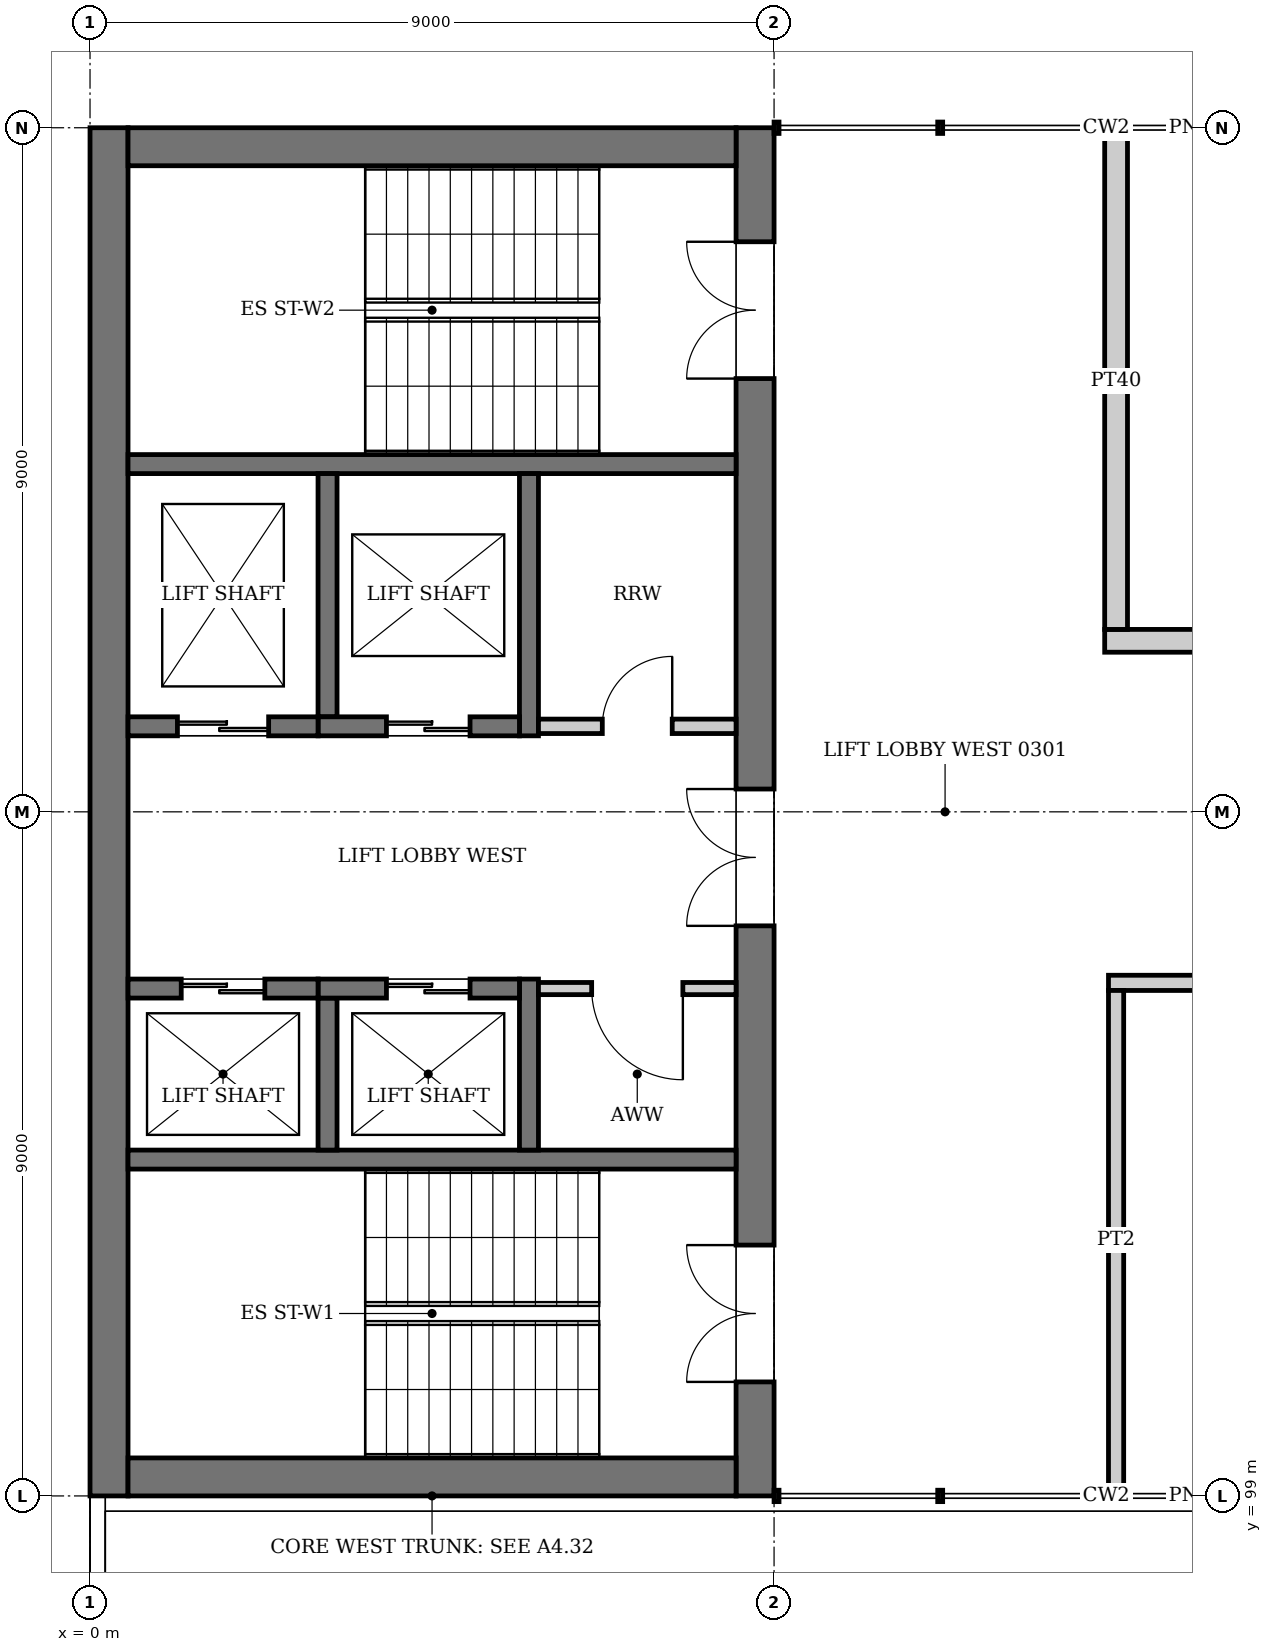
"""IFC4 building model, lengths in metres.
Left out: names, types, materials, properties, quantities, classifications, styles, units other than length and angle.
Written with IfcOpenShell. Run it as: python <this file> out.ifc"""

import sys

from ifc_helpers import new_model, si_unit, direction, frame, frame_2d, origin, place, context, subcontext, project, spatial, rectangle, extrude, element, fill, save


model = new_model("IFC4")
c1 = context("Model", 3, precision=1e-05, world=origin(), true_north=direction((0.0, 1.0)))
c2 = subcontext(c1, "Body", "Model", "MODEL_VIEW")
j1 = project(units=[si_unit("LENGTHUNIT", "METRE"), si_unit("PLANEANGLEUNIT", "RADIAN")], contexts=[c1])
p1 = place(None, origin())
s1 = spatial("IfcSite", under=j1, at=p1, CompositionType="ELEMENT")
p2 = place(p1, origin())
s2 = spatial("IfcBuilding", under=s1, at=p2, CompositionType="ELEMENT")
p3 = place(p2, frame((0.0, 0.0, 15.0)))
s3 = spatial("IfcBuildingStorey", under=s2, at=p3, CompositionType="ELEMENT", Elevation=15.0)
p4 = place(p3, frame((0.25, 99.0, 0.0), z_axis=(0.0, 0.0, 1.0), x_axis=(0.0, 1.0, 0.0)))
e1 = element("IfcWall", 1, at=p4, inside=s3, PredefinedType="SHEAR", context=c2, shape_type="SweptSolid", body=[
    extrude(rectangle(XDim=18.0, YDim=0.5, at=frame_2d((9.0, 0.0))), origin(), (0.0, 0.0, 1.0), 4.2),
])
p5 = place(p3, frame((8.75, 99.0, 0.0), z_axis=(0.0, 0.0, 1.0), x_axis=(0.0, 1.0, 0.0)))
e2 = element("IfcWall", 2, at=p5, inside=s3, PredefinedType="SHEAR", context=c2, shape_type="SweptSolid", body=[
    extrude(rectangle(XDim=18.0, YDim=0.5, at=frame_2d((9.0, 0.0))), origin(), (0.0, 0.0, 1.0), 4.2),
])
p6 = place(p5, frame((1.5, 0.0, 0.0)))
e3 = element("IfcOpeningElement", 3, at=p6, cuts=e2, PredefinedType="OPENING", context=c2, shape_type="SweptSolid", body=[
    extrude(rectangle(XDim=1.8, YDim=2.1, at=frame_2d((0.9, 1.05))), frame((0.0, 0.26, 0.0), z_axis=(0.0, -1.0, 0.0), x_axis=(1.0, 0.0, 0.0)), (0.0, 0.0, 1.0), 0.52),
])
p7 = place(p5, frame((14.7, 0.0, 0.0)))
e4 = element("IfcOpeningElement", 4, at=p7, cuts=e2, PredefinedType="OPENING", context=c2, shape_type="SweptSolid", body=[
    extrude(rectangle(XDim=1.8, YDim=2.1, at=frame_2d((0.9, 1.05))), frame((0.0, 0.26, 0.0), z_axis=(0.0, -1.0, 0.0), x_axis=(1.0, 0.0, 0.0)), (0.0, 0.0, 1.0), 0.52),
])
p8 = place(p5, frame((7.5, 0.0, 0.0)))
e5 = element("IfcOpeningElement", 5, at=p8, cuts=e2, PredefinedType="OPENING", context=c2, shape_type="SweptSolid", body=[
    extrude(rectangle(XDim=1.8, YDim=2.1, at=frame_2d((0.9, 1.05))), frame((0.0, 0.26, 0.0), z_axis=(0.0, -1.0, 0.0), x_axis=(1.0, 0.0, 0.0)), (0.0, 0.0, 1.0), 0.52),
])
for number, where, z_axis, x_axis in (
    (6, (0.5, 99.25, 0.0), (0.0, 0.0, 1.0), (1.0, 0.0, 0.0)),
    (7, (0.5, 116.75, 0.0), (0.0, 0.0, 1.0), (1.0, 0.0, 0.0)),
):
    element("IfcWall", number, at=place(p3, frame(where, z_axis=z_axis, x_axis=x_axis)), inside=s3, PredefinedType="SHEAR", context=c2, shape_type="SweptSolid", body=[
        extrude(rectangle(XDim=8.0, YDim=0.5, at=frame_2d((4.0, 0.0))), origin(), (0.0, 0.0, 1.0), 4.2),
    ])
p9 = place(p3, frame((0.1, 90.0, 0.0), z_axis=(0.0, 0.0, 1.0), x_axis=(0.0, 1.0, 0.0)))
e8 = element("IfcWall", 8, at=p9, inside=s3, PredefinedType="PARAPET", context=c2, shape_type="SweptSolid", body=[
    extrude(rectangle(XDim=9.0, YDim=0.2, at=frame_2d((4.5, 0.0))), origin(), (0.0, 0.0, 1.0), 1.14),
])
for number, where, z_axis, x_axis in (
    (9, (8.5, 103.425, 0.0), (0.0, 0.0, 1.0), (-1.0, 0.0, 0.0)),
    (10, (8.5, 112.575, 0.0), (0.0, 0.0, 1.0), (-1.0, 0.0, 0.0)),
):
    element("IfcWall", number, at=place(p3, frame(where, z_axis=z_axis, x_axis=x_axis)), inside=s3, PredefinedType="SOLIDWALL", context=c2, shape_type="SweptSolid", body=[
        extrude(rectangle(XDim=8.0, YDim=0.25, at=frame_2d((4.0, 0.0))), origin(), (0.0, 0.0, 1.0), 3.95),
    ])
p10 = place(p3, frame((5.775, 103.55, 0.0), z_axis=(0.0, 0.0, 1.0), x_axis=(0.0, 1.0, 0.0)))
e11 = element("IfcWall", 11, at=p10, inside=s3, PredefinedType="SOLIDWALL", context=c2, shape_type="SweptSolid", body=[
    extrude(rectangle(XDim=2.25, YDim=0.25, at=frame_2d((1.125, 0.0))), origin(), (0.0, 0.0, 1.0), 4.2),
])
p11 = place(p3, frame((3.125, 103.55, 0.0), z_axis=(0.0, 0.0, 1.0), x_axis=(0.0, 1.0, 0.0)))
e12 = element("IfcWall", 12, at=p11, inside=s3, PredefinedType="SOLIDWALL", context=c2, shape_type="SweptSolid", body=[
    extrude(rectangle(XDim=2.0, YDim=0.25, at=frame_2d((1.0, 0.0))), origin(), (0.0, 0.0, 1.0), 4.2),
])
p12 = place(p3, frame((5.65, 105.675, 0.0), z_axis=(0.0, 0.0, 1.0), x_axis=(-1.0, 0.0, 0.0)))
e13 = element("IfcWall", 13, at=p12, inside=s3, PredefinedType="SOLIDWALL", context=c2, shape_type="SweptSolid", body=[
    extrude(rectangle(XDim=2.65, YDim=0.25, at=frame_2d((1.325, 0.0))), origin(), (0.0, 0.0, 1.0), 4.2),
])
p13 = place(p12, frame((0.65, 0.0, 0.0)))
e14 = element("IfcOpeningElement", 14, at=p13, cuts=e13, PredefinedType="OPENING", context=c2, shape_type="SweptSolid", body=[
    extrude(rectangle(XDim=1.1, YDim=2.1, at=frame_2d((0.55, 1.05))), frame((0.0, 0.135, 0.0), z_axis=(0.0, -1.0, 0.0), x_axis=(1.0, 0.0, 0.0)), (0.0, 0.0, 1.0), 0.27),
])
p14 = place(p3, frame((3.0, 105.675, 0.0), z_axis=(0.0, 0.0, 1.0), x_axis=(-1.0, 0.0, 0.0)))
e15 = element("IfcWall", 15, at=p14, inside=s3, PredefinedType="SOLIDWALL", context=c2, shape_type="SweptSolid", body=[
    extrude(rectangle(XDim=2.5, YDim=0.25, at=frame_2d((1.25, 0.0))), origin(), (0.0, 0.0, 1.0), 4.2),
])
p15 = place(p14, frame((0.7, 0.0, 0.0)))
e16 = element("IfcOpeningElement", 16, at=p15, cuts=e15, PredefinedType="OPENING", context=c2, shape_type="SweptSolid", body=[
    extrude(rectangle(XDim=1.1, YDim=2.1, at=frame_2d((0.55, 1.05))), frame((0.0, 0.135, 0.0), z_axis=(0.0, -1.0, 0.0), x_axis=(1.0, 0.0, 0.0)), (0.0, 0.0, 1.0), 0.27),
])
p16 = place(p3, frame((5.775, 109.0, 0.0), z_axis=(0.0, 0.0, 1.0), x_axis=(0.0, 1.0, 0.0)))
e17 = element("IfcWall", 17, at=p16, inside=s3, PredefinedType="SOLIDWALL", context=c2, shape_type="SweptSolid", body=[
    extrude(rectangle(XDim=3.45, YDim=0.25, at=frame_2d((1.725, 0.0))), origin(), (0.0, 0.0, 1.0), 4.2),
])
p17 = place(p3, frame((3.125, 109.25, 0.0), z_axis=(0.0, 0.0, 1.0), x_axis=(0.0, 1.0, 0.0)))
e18 = element("IfcWall", 18, at=p17, inside=s3, PredefinedType="SOLIDWALL", context=c2, shape_type="SweptSolid", body=[
    extrude(rectangle(XDim=3.2, YDim=0.25, at=frame_2d((1.6, 0.0))), origin(), (0.0, 0.0, 1.0), 4.2),
])
p18 = place(p3, frame((5.65, 109.125, 0.0), z_axis=(0.0, 0.0, 1.0), x_axis=(-1.0, 0.0, 0.0)))
e19 = element("IfcWall", 19, at=p18, inside=s3, PredefinedType="SOLIDWALL", context=c2, shape_type="SweptSolid", body=[
    extrude(rectangle(XDim=2.65, YDim=0.25, at=frame_2d((1.325, 0.0))), origin(), (0.0, 0.0, 1.0), 4.2),
])
p19 = place(p18, frame((0.65, 0.0, 0.0)))
e20 = element("IfcOpeningElement", 20, at=p19, cuts=e19, PredefinedType="OPENING", context=c2, shape_type="SweptSolid", body=[
    extrude(rectangle(XDim=1.1, YDim=2.1, at=frame_2d((0.55, 1.05))), frame((0.0, 0.135, 0.0), z_axis=(0.0, -1.0, 0.0), x_axis=(1.0, 0.0, 0.0)), (0.0, 0.0, 1.0), 0.27),
])
p20 = place(p3, frame((3.0, 109.125, 0.0), z_axis=(0.0, 0.0, 1.0), x_axis=(-1.0, 0.0, 0.0)))
e21 = element("IfcWall", 21, at=p20, inside=s3, PredefinedType="SOLIDWALL", context=c2, shape_type="SweptSolid", body=[
    extrude(rectangle(XDim=2.5, YDim=0.25, at=frame_2d((1.25, 0.0))), origin(), (0.0, 0.0, 1.0), 4.2),
])
p21 = place(p20, frame((0.65, 0.0, 0.0)))
e22 = element("IfcOpeningElement", 22, at=p21, cuts=e21, PredefinedType="OPENING", context=c2, shape_type="SweptSolid", body=[
    extrude(rectangle(XDim=1.2, YDim=2.1, at=frame_2d((0.6, 1.05))), frame((0.0, 0.135, 0.0), z_axis=(0.0, -1.0, 0.0), x_axis=(1.0, 0.0, 0.0)), (0.0, 0.0, 1.0), 0.27),
])
p22 = place(p3, frame((8.5, 105.675, 0.0), z_axis=(0.0, 0.0, 1.0), x_axis=(-1.0, 0.0, 0.0)))
e23 = element("IfcWall", 23, at=p22, inside=s3, PredefinedType="PARTITIONING", context=c2, shape_type="SweptSolid", body=[
    extrude(rectangle(XDim=2.6, YDim=0.16, at=frame_2d((1.3, 0.0))), origin(), (0.0, 0.0, 1.0), 3.95),
])
p23 = place(p22, frame((0.7, 0.0, 0.0)))
e24 = element("IfcOpeningElement", 24, at=p23, cuts=e23, PredefinedType="OPENING", context=c2, shape_type="SweptSolid", body=[
    extrude(rectangle(XDim=1.2, YDim=2.1, at=frame_2d((0.6, 1.05))), frame((0.0, 0.09, 0.0), z_axis=(0.0, -1.0, 0.0), x_axis=(1.0, 0.0, 0.0)), (0.0, 0.0, 1.0), 0.18),
])
p24 = place(p3, frame((8.5, 109.125, 0.0), z_axis=(0.0, 0.0, 1.0), x_axis=(-1.0, 0.0, 0.0)))
e25 = element("IfcWall", 25, at=p24, inside=s3, PredefinedType="PARTITIONING", context=c2, shape_type="SweptSolid", body=[
    extrude(rectangle(XDim=2.6, YDim=0.19, at=frame_2d((1.3, 0.0))), origin(), (0.0, 0.0, 1.0), 3.95),
])
p25 = place(p24, frame((0.84, 0.0, 0.0)))
e26 = element("IfcOpeningElement", 26, at=p25, cuts=e25, PredefinedType="OPENING", context=c2, shape_type="SweptSolid", body=[
    extrude(rectangle(XDim=0.92, YDim=2.1, at=frame_2d((0.46, 1.05))), frame((0.0, 0.105, 0.0), z_axis=(0.0, -1.0, 0.0), x_axis=(1.0, 0.0, 0.0)), (0.0, 0.0, 1.0), 0.21),
])
p26 = place(p3, frame((13.4, 105.75, 0.0), z_axis=(0.0, 0.0, 1.0), x_axis=(1.0, 0.0, 0.0)))
e27 = element("IfcWall", 27, at=p26, inside=s3, PredefinedType="PARTITIONING", context=c2, shape_type="SweptSolid", body=[
    extrude(rectangle(XDim=27.2, YDim=0.2, at=frame_2d((13.6, 0.0))), origin(), (0.0, 0.0, 1.0), 3.25),
])
p27 = place(p26, frame((5.95, 0.0, 0.0)))
e28 = element("IfcOpeningElement", 28, at=p27, cuts=e27, PredefinedType="OPENING", context=c2, shape_type="SweptSolid", body=[
    extrude(rectangle(XDim=1.8, YDim=2.1, at=frame_2d((0.9, 1.05))), frame((0.0, 0.11, 0.0), z_axis=(0.0, -1.0, 0.0), x_axis=(1.0, 0.0, 0.0)), (0.0, 0.0, 1.0), 0.22),
])
p28 = place(p26, frame((15.1, 0.0, 0.0)))
e29 = element("IfcOpeningElement", 29, at=p28, cuts=e27, PredefinedType="OPENING", context=c2, shape_type="SweptSolid", body=[
    extrude(rectangle(XDim=1.5, YDim=2.1, at=frame_2d((0.75, 1.05))), frame((0.0, 0.11, 0.0), z_axis=(0.0, -1.0, 0.0), x_axis=(1.0, 0.0, 0.0)), (0.0, 0.0, 1.0), 0.22),
])
p29 = place(p26, frame((19.95, 0.0, 0.0)))
e30 = element("IfcOpeningElement", 30, at=p29, cuts=e27, PredefinedType="OPENING", context=c2, shape_type="SweptSolid", body=[
    extrude(rectangle(XDim=0.8, YDim=2.1, at=frame_2d((0.4, 1.05))), frame((0.0, 0.11, 0.0), z_axis=(0.0, -1.0, 0.0), x_axis=(1.0, 0.0, 0.0)), (0.0, 0.0, 1.0), 0.22),
])
p30 = place(p26, frame((24.45, 0.0, 0.0)))
e31 = element("IfcOpeningElement", 31, at=p30, cuts=e27, PredefinedType="OPENING", context=c2, shape_type="SweptSolid", body=[
    extrude(rectangle(XDim=0.8, YDim=2.1, at=frame_2d((0.4, 1.05))), frame((0.0, 0.11, 0.0), z_axis=(0.0, -1.0, 0.0), x_axis=(1.0, 0.0, 0.0)), (0.0, 0.0, 1.0), 0.22),
])
p31 = place(p3, frame((13.35, 110.25, 0.0), z_axis=(0.0, 0.0, 1.0), x_axis=(1.0, 0.0, 0.0)))
e32 = element("IfcWall", 32, at=p31, inside=s3, PredefinedType="PARTITIONING", context=c2, shape_type="SweptSolid", body=[
    extrude(rectangle(XDim=9.3, YDim=0.3, at=frame_2d((4.65, 0.0))), origin(), (0.0, 0.0, 1.0), 3.25),
])
p32 = place(p31, frame((3.75, 0.0, 0.0)))
e33 = element("IfcOpeningElement", 33, at=p32, cuts=e32, PredefinedType="OPENING", context=c2, shape_type="SweptSolid", body=[
    extrude(rectangle(XDim=1.8, YDim=2.1, at=frame_2d((0.9, 1.05))), frame((0.0, 0.16, 0.0), z_axis=(0.0, -1.0, 0.0), x_axis=(1.0, 0.0, 0.0)), (0.0, 0.0, 1.0), 0.32),
])
p33 = place(p3, frame((13.5, 99.075, 0.0), z_axis=(0.0, 0.0, 1.0), x_axis=(0.0, 1.0, 0.0)))
e34 = element("IfcWall", 34, at=p33, inside=s3, PredefinedType="PARTITIONING", context=c2, shape_type="SweptSolid", body=[
    extrude(rectangle(XDim=6.575, YDim=0.2, at=frame_2d((3.288, 0.0))), origin(), (0.0, 0.0, 1.0), 3.25),
])
p34 = place(p3, frame((13.5, 110.4, 0.0), z_axis=(0.0, 0.0, 1.0), x_axis=(0.0, 1.0, 0.0)))
e35 = element("IfcWall", 35, at=p34, inside=s3, PredefinedType="PARTITIONING", context=c2, shape_type="SweptSolid", body=[
    extrude(rectangle(XDim=6.525, YDim=0.3, at=frame_2d((3.263, 0.0))), origin(), (0.0, 0.0, 1.0), 3.25),
])
p35 = place(p13, origin())
e36 = element("IfcDoor", 36, at=p35, inside=s3, OperationType="DOUBLE_DOOR_SLIDING", PredefinedType="DOOR", context=c2, shape_type="SweptSolid", body=[
    extrude(rectangle(XDim=1.1, YDim=2.1, at=frame_2d((0.55, 1.05))), frame((0.0, 0.025, 0.0), z_axis=(0.0, -1.0, 0.0), x_axis=(1.0, 0.0, 0.0)), (0.0, 0.0, 1.0), 0.05),
])
fill(e14, e36)
p36 = place(p15, origin())
e37 = element("IfcDoor", 37, at=p36, inside=s3, OperationType="DOUBLE_DOOR_SLIDING", PredefinedType="DOOR", context=c2, shape_type="SweptSolid", body=[
    extrude(rectangle(XDim=1.1, YDim=2.1, at=frame_2d((0.55, 1.05))), frame((0.0, 0.025, 0.0), z_axis=(0.0, -1.0, 0.0), x_axis=(1.0, 0.0, 0.0)), (0.0, 0.0, 1.0), 0.05),
])
fill(e16, e37)
p37 = place(p19, origin())
e38 = element("IfcDoor", 38, at=p37, inside=s3, OperationType="DOUBLE_DOOR_SLIDING", PredefinedType="DOOR", context=c2, shape_type="SweptSolid", body=[
    extrude(rectangle(XDim=1.1, YDim=2.1, at=frame_2d((0.55, 1.05))), frame((0.0, 0.025, 0.0), z_axis=(0.0, -1.0, 0.0), x_axis=(1.0, 0.0, 0.0)), (0.0, 0.0, 1.0), 0.05),
])
fill(e20, e38)
p38 = place(p21, origin())
e39 = element("IfcDoor", 39, at=p38, inside=s3, OperationType="DOUBLE_DOOR_SLIDING", PredefinedType="DOOR", context=c2, shape_type="SweptSolid", body=[
    extrude(rectangle(XDim=1.2, YDim=2.1, at=frame_2d((0.6, 1.05))), frame((0.0, 0.025, 0.0), z_axis=(0.0, -1.0, 0.0), x_axis=(1.0, 0.0, 0.0)), (0.0, 0.0, 1.0), 0.05),
])
fill(e22, e39)
p39 = place(p6, origin())
e40 = element("IfcDoor", 40, at=p39, inside=s3, OperationType="DOUBLE_DOOR_SINGLE_SWING", PredefinedType="DOOR", context=c2, shape_type="SweptSolid", body=[
    extrude(rectangle(XDim=1.8, YDim=2.1, at=frame_2d((0.9, 1.05))), frame((0.0, 0.025, 0.0), z_axis=(0.0, -1.0, 0.0), x_axis=(1.0, 0.0, 0.0)), (0.0, 0.0, 1.0), 0.05),
])
fill(e3, e40)
p40 = place(p7, origin())
e41 = element("IfcDoor", 41, at=p40, inside=s3, OperationType="DOUBLE_DOOR_SINGLE_SWING", PredefinedType="DOOR", context=c2, shape_type="SweptSolid", body=[
    extrude(rectangle(XDim=1.8, YDim=2.1, at=frame_2d((0.9, 1.05))), frame((0.0, 0.025, 0.0), z_axis=(0.0, -1.0, 0.0), x_axis=(1.0, 0.0, 0.0)), (0.0, 0.0, 1.0), 0.05),
])
fill(e4, e41)
p41 = place(p8, origin())
e42 = element("IfcDoor", 42, at=p41, inside=s3, OperationType="DOUBLE_DOOR_SINGLE_SWING", PredefinedType="DOOR", context=c2, shape_type="SweptSolid", body=[
    extrude(rectangle(XDim=1.8, YDim=2.1, at=frame_2d((0.9, 1.05))), frame((0.0, 0.025, 0.0), z_axis=(0.0, -1.0, 0.0), x_axis=(1.0, 0.0, 0.0)), (0.0, 0.0, 1.0), 0.05),
])
fill(e5, e42)
p42 = place(p23, origin())
e43 = element("IfcDoor", 43, at=p42, inside=s3, OperationType="SINGLE_SWING_LEFT", PredefinedType="DOOR", context=c2, shape_type="SweptSolid", body=[
    extrude(rectangle(XDim=1.2, YDim=2.1, at=frame_2d((0.6, 1.05))), frame((0.0, 0.025, 0.0), z_axis=(0.0, -1.0, 0.0), x_axis=(1.0, 0.0, 0.0)), (0.0, 0.0, 1.0), 0.05),
])
fill(e24, e43)
p43 = place(p25, frame((0.92, 0.0, 0.0), z_axis=(0.0, 0.0, 1.0), x_axis=(-1.0, 0.0, 0.0)))
e44 = element("IfcDoor", 44, at=p43, inside=s3, OperationType="SINGLE_SWING_RIGHT", PredefinedType="DOOR", context=c2, shape_type="SweptSolid", body=[
    extrude(rectangle(XDim=0.92, YDim=2.1, at=frame_2d((0.46, 1.05))), frame((0.0, 0.025, 0.0), z_axis=(0.0, -1.0, 0.0), x_axis=(1.0, 0.0, 0.0)), (0.0, 0.0, 1.0), 0.05),
])
fill(e26, e44)
save(model, sys.argv[1])
